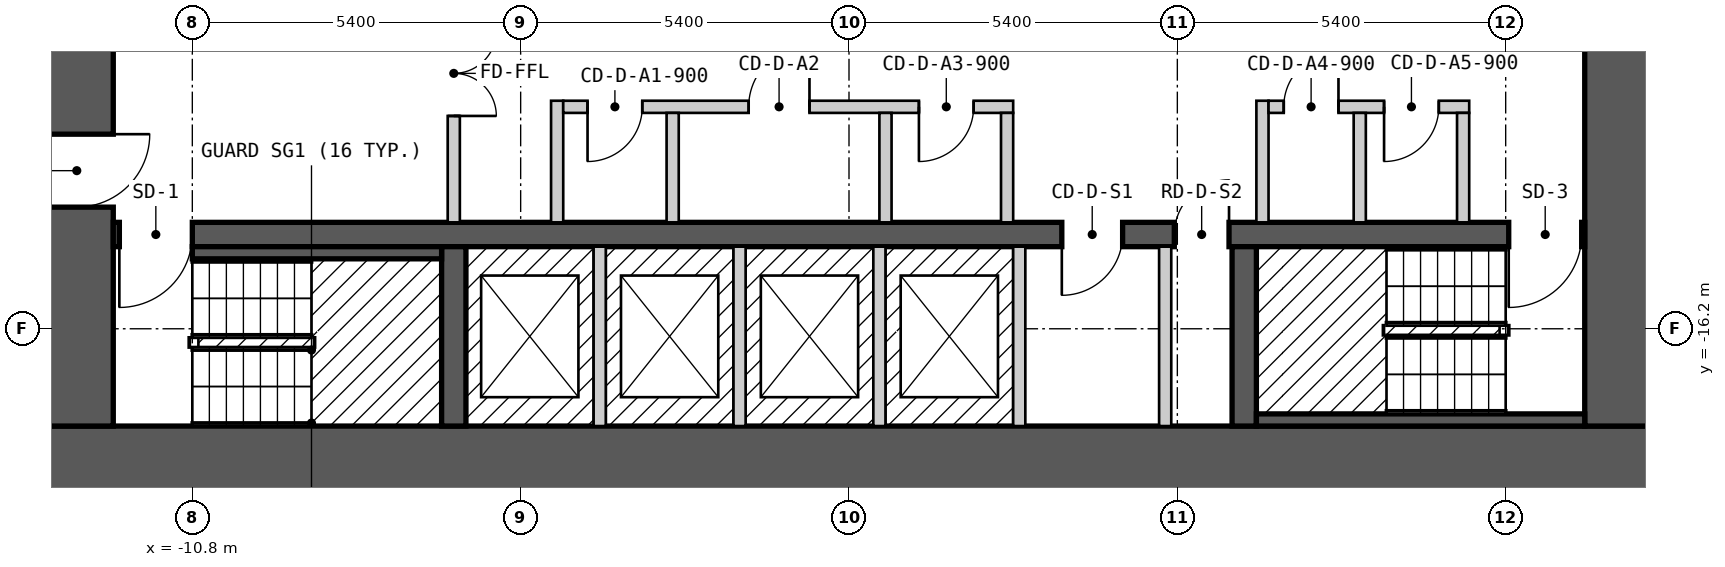
"""IFC4 building model, lengths in metres.
Left out: names, types, materials, properties, quantities, classifications, styles, units other than length and angle.
Written with IfcOpenShell. Run it as: python <this file> out.ifc"""

import sys

from ifc_helpers import new_model, si_unit, direction, frame, frame_2d, origin, place, context, subcontext, project, spatial, rectangle, extrude, element, fill, save


model = new_model("IFC4")
c1 = context("Model", 3, precision=1e-05, world=origin(), true_north=direction((0.0, 1.0)))
c2 = subcontext(c1, "Body", "Model", "MODEL_VIEW")
j1 = project(units=[si_unit("LENGTHUNIT", "METRE"), si_unit("PLANEANGLEUNIT", "RADIAN")], contexts=[c1])
p1 = place(None, origin())
s1 = spatial("IfcSite", under=j1, at=p1, CompositionType="ELEMENT")
p2 = place(p1, origin())
s2 = spatial("IfcBuilding", under=s1, at=p2, CompositionType="ELEMENT")
p3 = place(p2, frame((0.0, 0.0, 56.4)))
s3 = spatial("IfcBuildingStorey", under=s2, at=p3, CompositionType="ELEMENT", Elevation=56.4)
p4 = place(p3, frame((-13.3, -18.4, 0.0), z_axis=(0.0, 0.0, 1.0), x_axis=(1.0, 0.0, 0.0)))
e1 = element("IfcWall", 1, at=p4, inside=s3, PredefinedType="SHEAR", context=c2, shape_type="SweptSolid", body=[
    extrude(rectangle(XDim=26.6, YDim=1.2, at=frame_2d((13.3, 0.0))), origin(), (0.0, 0.0, 1.0), 2.7),
])
p5 = place(p3, frame((-12.7, -17.8, 0.0), z_axis=(0.0, 0.0, 1.0), x_axis=(0.0, 1.0, 0.0)))
e2 = element("IfcWall", 2, at=p5, inside=s3, PredefinedType="SHEAR", context=c2, shape_type="SweptSolid", body=[
    extrude(rectangle(XDim=11.6, YDim=1.2, at=frame_2d((5.8, 0.0))), origin(), (0.0, 0.0, 1.0), 2.7),
])
p6 = place(p5, frame((3.6, 0.0, 0.0)))
e3 = element("IfcOpeningElement", 3, at=p6, cuts=e2, PredefinedType="OPENING", context=c2, shape_type="SweptSolid", body=[
    extrude(rectangle(XDim=1.2, YDim=2.1, at=frame_2d((0.6, 1.05))), frame((0.0, 0.61, 0.0), z_axis=(0.0, -1.0, 0.0), x_axis=(1.0, 0.0, 0.0)), (0.0, 0.0, 1.0), 1.22),
])
p7 = place(p3, frame((12.7, -17.8, 0.0), z_axis=(0.0, 0.0, 1.0), x_axis=(0.0, 1.0, 0.0)))
e4 = element("IfcWall", 4, at=p7, inside=s3, PredefinedType="SHEAR", context=c2, shape_type="SweptSolid", body=[
    extrude(rectangle(XDim=11.6, YDim=1.2, at=frame_2d((5.8, 0.0))), origin(), (0.0, 0.0, 1.0), 2.7),
])
p8 = place(p3, frame((-12.1, -14.65, 0.0), z_axis=(0.0, 0.0, 1.0), x_axis=(1.0, 0.0, 0.0)))
e5 = element("IfcWall", 5, at=p8, inside=s3, PredefinedType="SHEAR", context=c2, shape_type="SweptSolid", body=[
    extrude(rectangle(XDim=24.2, YDim=0.4, at=frame_2d((12.1, 0.0))), origin(), (0.0, 0.0, 1.0), 2.7),
])
p9 = place(p8, frame((1.3, 0.0, 0.0), z_axis=(0.0, 0.0, 1.0), x_axis=(-1.0, 0.0, 0.0)))
e6 = element("IfcOpeningElement", 6, at=p9, cuts=e5, PredefinedType="OPENING", context=c2, shape_type="SweptSolid", body=[
    extrude(rectangle(XDim=1.2, YDim=2.1, at=frame_2d((0.6, 1.05))), frame((0.0, 0.21, 0.0), z_axis=(0.0, -1.0, 0.0), x_axis=(1.0, 0.0, 0.0)), (0.0, 0.0, 1.0), 0.42),
])
p10 = place(p8, frame((24.15, 0.0, 0.0), z_axis=(0.0, 0.0, 1.0), x_axis=(-1.0, 0.0, 0.0)))
e7 = element("IfcOpeningElement", 7, at=p10, cuts=e5, PredefinedType="OPENING", context=c2, shape_type="SweptSolid", body=[
    extrude(rectangle(XDim=1.2, YDim=2.1, at=frame_2d((0.6, 1.05))), frame((0.0, 0.21, 0.0), z_axis=(0.0, -1.0, 0.0), x_axis=(1.0, 0.0, 0.0)), (0.0, 0.0, 1.0), 0.42),
])
p11 = place(p8, frame((16.6, 0.0, 0.0), z_axis=(0.0, 0.0, 1.0), x_axis=(-1.0, 0.0, 0.0)))
e8 = element("IfcOpeningElement", 8, at=p11, cuts=e5, PredefinedType="OPENING", context=c2, shape_type="SweptSolid", body=[
    extrude(rectangle(XDim=1.0, YDim=2.1, at=frame_2d((0.5, 1.05))), frame((0.0, 0.21, 0.0), z_axis=(0.0, -1.0, 0.0), x_axis=(1.0, 0.0, 0.0)), (0.0, 0.0, 1.0), 0.42),
])
p12 = place(p8, frame((18.35, 0.0, 0.0), z_axis=(0.0, 0.0, 1.0), x_axis=(-1.0, 0.0, 0.0)))
e9 = element("IfcOpeningElement", 9, at=p12, cuts=e5, PredefinedType="OPENING", context=c2, shape_type="SweptSolid", body=[
    extrude(rectangle(XDim=0.9, YDim=2.1, at=frame_2d((0.45, 1.05))), frame((0.0, 0.21, 0.0), z_axis=(0.0, -1.0, 0.0), x_axis=(1.0, 0.0, 0.0)), (0.0, 0.0, 1.0), 0.42),
])
for number, where, z_axis, x_axis in (
    (10, (-6.5, -17.8, 0.0), (0.0, 0.0, 1.0), (0.0, 1.0, 0.0)),
    (11, (6.5, -17.8, 0.0), (0.0, 0.0, 1.0), (0.0, 1.0, 0.0)),
):
    element("IfcWall", number, at=place(p3, frame(where, z_axis=z_axis, x_axis=x_axis)), inside=s3, PredefinedType="SHEAR", context=c2, shape_type="SweptSolid", body=[
        extrude(rectangle(XDim=2.95, YDim=0.4, at=frame_2d((1.475, 0.0))), origin(), (0.0, 0.0, 1.0), 2.7),
    ])
p13 = place(p3, frame((-10.8, -14.95, 0.0), z_axis=(0.0, 0.0, 1.0), x_axis=(1.0, 0.0, 0.0)))
e12 = element("IfcWall", 12, at=p13, inside=s3, PredefinedType="SOLIDWALL", context=c2, shape_type="SweptSolid", body=[
    extrude(rectangle(XDim=4.1, YDim=0.2, at=frame_2d((2.05, 0.0))), origin(), (0.0, 0.0, 1.0), 2.7),
])
p14 = place(p3, frame((-6.5, -14.45, 0.0), z_axis=(0.0, 0.0, 1.0), x_axis=(0.0, 1.0, 0.0)))
e13 = element("IfcWall", 13, at=p14, inside=s3, PredefinedType="PARTITIONING", context=c2, shape_type="SweptSolid", body=[
    extrude(rectangle(XDim=4.9, YDim=0.2, at=frame_2d((2.45, 0.0))), origin(), (0.0, 0.0, 1.0), 2.7),
])
p15 = place(p14, frame((3.15, 0.0, 0.0), z_axis=(0.0, 0.0, 1.0), x_axis=(-1.0, 0.0, 0.0)))
e14 = element("IfcOpeningElement", 14, at=p15, cuts=e13, PredefinedType="OPENING", context=c2, shape_type="SweptSolid", body=[
    extrude(rectangle(XDim=1.4, YDim=2.1, at=frame_2d((0.7, 1.05))), frame((0.0, 0.11, 0.0), z_axis=(0.0, -1.0, 0.0), x_axis=(1.0, 0.0, 0.0)), (0.0, 0.0, 1.0), 0.22),
])
p16 = place(p3, frame((-4.8, -14.45, 0.0), z_axis=(0.0, 0.0, 1.0), x_axis=(0.0, 1.0, 0.0)))
e15 = element("IfcWall", 15, at=p16, inside=s3, PredefinedType="PARTITIONING", context=c2, shape_type="SweptSolid", body=[
    extrude(rectangle(XDim=2.0, YDim=0.2, at=frame_2d((1.0, 0.0))), origin(), (0.0, 0.0, 1.0), 2.7),
])
p17 = place(p3, frame((-4.7, -12.55, 0.0), z_axis=(0.0, 0.0, 1.0), x_axis=(1.0, 0.0, 0.0)))
e16 = element("IfcWall", 16, at=p17, inside=s3, PredefinedType="PARTITIONING", context=c2, shape_type="SweptSolid", body=[
    extrude(rectangle(XDim=7.4, YDim=0.2, at=frame_2d((3.7, 0.0))), origin(), (0.0, 0.0, 1.0), 2.7),
])
p18 = place(p17, frame((1.3, 0.0, 0.0), z_axis=(0.0, 0.0, 1.0), x_axis=(-1.0, 0.0, 0.0)))
e17 = element("IfcOpeningElement", 17, at=p18, cuts=e16, PredefinedType="OPENING", context=c2, shape_type="SweptSolid", body=[
    extrude(rectangle(XDim=0.9, YDim=2.1, at=frame_2d((0.45, 1.05))), frame((0.0, 0.11, 0.0), z_axis=(0.0, -1.0, 0.0), x_axis=(1.0, 0.0, 0.0)), (0.0, 0.0, 1.0), 0.22),
])
p19 = place(p17, frame((4.05, 0.0, 0.0), z_axis=(0.0, 0.0, 1.0), x_axis=(-1.0, 0.0, 0.0)))
e18 = element("IfcOpeningElement", 18, at=p19, cuts=e16, PredefinedType="OPENING", context=c2, shape_type="SweptSolid", body=[
    extrude(rectangle(XDim=1.0, YDim=2.1, at=frame_2d((0.5, 1.05))), frame((0.0, 0.11, 0.0), z_axis=(0.0, -1.0, 0.0), x_axis=(1.0, 0.0, 0.0)), (0.0, 0.0, 1.0), 0.22),
])
p20 = place(p17, frame((6.75, 0.0, 0.0), z_axis=(0.0, 0.0, 1.0), x_axis=(-1.0, 0.0, 0.0)))
e19 = element("IfcOpeningElement", 19, at=p20, cuts=e16, PredefinedType="OPENING", context=c2, shape_type="SweptSolid", body=[
    extrude(rectangle(XDim=0.9, YDim=2.1, at=frame_2d((0.45, 1.05))), frame((0.0, 0.11, 0.0), z_axis=(0.0, -1.0, 0.0), x_axis=(1.0, 0.0, 0.0)), (0.0, 0.0, 1.0), 0.22),
])
p21 = place(p3, frame((-4.1, -17.8, 0.0), z_axis=(0.0, 0.0, 1.0), x_axis=(0.0, 1.0, 0.0)))
e20 = element("IfcWall", 20, at=p21, inside=s3, PredefinedType="SOLIDWALL", context=c2, shape_type="SweptSolid", body=[
    extrude(rectangle(XDim=2.95, YDim=0.2, at=frame_2d((1.475, 0.0))), origin(), (0.0, 0.0, 1.0), 2.7),
])
p22 = place(p3, frame((-2.9, -14.45, 0.0), z_axis=(0.0, 0.0, 1.0), x_axis=(0.0, 1.0, 0.0)))
e21 = element("IfcWall", 21, at=p22, inside=s3, PredefinedType="PARTITIONING", context=c2, shape_type="SweptSolid", body=[
    extrude(rectangle(XDim=1.8, YDim=0.2, at=frame_2d((0.9, 0.0))), origin(), (0.0, 0.0, 1.0), 2.7),
])
for number, where, z_axis, x_axis in (
    (22, (-1.8, -17.8, 0.0), (0.0, 0.0, 1.0), (0.0, 1.0, 0.0)),
    (23, (0.5, -17.8, 0.0), (0.0, 0.0, 1.0), (0.0, 1.0, 0.0)),
):
    element("IfcWall", number, at=place(p3, frame(where, z_axis=z_axis, x_axis=x_axis)), inside=s3, PredefinedType="SOLIDWALL", context=c2, shape_type="SweptSolid", body=[
        extrude(rectangle(XDim=2.95, YDim=0.2, at=frame_2d((1.475, 0.0))), origin(), (0.0, 0.0, 1.0), 2.7),
    ])
for number, where, z_axis, x_axis in (
    (24, (0.6, -14.45, 0.0), (0.0, 0.0, 1.0), (0.0, 1.0, 0.0)),
    (25, (2.6, -14.45, 0.0), (0.0, 0.0, 1.0), (0.0, 1.0, 0.0)),
):
    element("IfcWall", number, at=place(p3, frame(where, z_axis=z_axis, x_axis=x_axis)), inside=s3, PredefinedType="PARTITIONING", context=c2, shape_type="SweptSolid", body=[
        extrude(rectangle(XDim=1.8, YDim=0.2, at=frame_2d((0.9, 0.0))), origin(), (0.0, 0.0, 1.0), 2.7),
    ])
p23 = place(p3, frame((2.8, -17.8, 0.0), z_axis=(0.0, 0.0, 1.0), x_axis=(0.0, 1.0, 0.0)))
e26 = element("IfcWall", 26, at=p23, inside=s3, PredefinedType="SOLIDWALL", context=c2, shape_type="SweptSolid", body=[
    extrude(rectangle(XDim=2.95, YDim=0.2, at=frame_2d((1.475, 0.0))), origin(), (0.0, 0.0, 1.0), 2.7),
])
p24 = place(p3, frame((5.2, -17.8, 0.0), z_axis=(0.0, 0.0, 1.0), x_axis=(0.0, 1.0, 0.0)))
e27 = element("IfcWall", 27, at=p24, inside=s3, PredefinedType="PARTITIONING", context=c2, shape_type="SweptSolid", body=[
    extrude(rectangle(XDim=2.95, YDim=0.2, at=frame_2d((1.475, 0.0))), origin(), (0.0, 0.0, 1.0), 2.7),
])
p25 = place(p3, frame((6.7, -17.7, 0.0), z_axis=(0.0, 0.0, 1.0), x_axis=(1.0, 0.0, 0.0)))
e28 = element("IfcWall", 28, at=p25, inside=s3, PredefinedType="SOLIDWALL", context=c2, shape_type="SweptSolid", body=[
    extrude(rectangle(XDim=5.4, YDim=0.2, at=frame_2d((2.7, 0.0))), origin(), (0.0, 0.0, 1.0), 2.7),
])
p26 = place(p3, frame((6.8, -14.45, 0.0), z_axis=(0.0, 0.0, 1.0), x_axis=(0.0, 1.0, 0.0)))
e29 = element("IfcWall", 29, at=p26, inside=s3, PredefinedType="PARTITIONING", context=c2, shape_type="SweptSolid", body=[
    extrude(rectangle(XDim=2.0, YDim=0.2, at=frame_2d((1.0, 0.0))), origin(), (0.0, 0.0, 1.0), 2.7),
])
p27 = place(p3, frame((6.9, -12.55, 0.0), z_axis=(0.0, 0.0, 1.0), x_axis=(1.0, 0.0, 0.0)))
e30 = element("IfcWall", 30, at=p27, inside=s3, PredefinedType="PARTITIONING", context=c2, shape_type="SweptSolid", body=[
    extrude(rectangle(XDim=3.3, YDim=0.2, at=frame_2d((1.65, 0.0))), origin(), (0.0, 0.0, 1.0), 2.7),
])
p28 = place(p27, frame((1.15, 0.0, 0.0), z_axis=(0.0, 0.0, 1.0), x_axis=(-1.0, 0.0, 0.0)))
e31 = element("IfcOpeningElement", 31, at=p28, cuts=e30, PredefinedType="OPENING", context=c2, shape_type="SweptSolid", body=[
    extrude(rectangle(XDim=0.9, YDim=2.1, at=frame_2d((0.45, 1.05))), frame((0.0, 0.11, 0.0), z_axis=(0.0, -1.0, 0.0), x_axis=(1.0, 0.0, 0.0)), (0.0, 0.0, 1.0), 0.22),
])
p29 = place(p27, frame((2.8, 0.0, 0.0), z_axis=(0.0, 0.0, 1.0), x_axis=(-1.0, 0.0, 0.0)))
e32 = element("IfcOpeningElement", 32, at=p29, cuts=e30, PredefinedType="OPENING", context=c2, shape_type="SweptSolid", body=[
    extrude(rectangle(XDim=0.9, YDim=2.1, at=frame_2d((0.45, 1.05))), frame((0.0, 0.11, 0.0), z_axis=(0.0, -1.0, 0.0), x_axis=(1.0, 0.0, 0.0)), (0.0, 0.0, 1.0), 0.22),
])
for number, where, z_axis, x_axis in (
    (33, (8.4, -14.45, 0.0), (0.0, 0.0, 1.0), (0.0, 1.0, 0.0)),
    (34, (10.1, -14.45, 0.0), (0.0, 0.0, 1.0), (0.0, 1.0, 0.0)),
):
    element("IfcWall", number, at=place(p3, frame(where, z_axis=z_axis, x_axis=x_axis)), inside=s3, PredefinedType="PARTITIONING", context=c2, shape_type="SweptSolid", body=[
        extrude(rectangle(XDim=1.8, YDim=0.2, at=frame_2d((0.9, 0.0))), origin(), (0.0, 0.0, 1.0), 2.7),
    ])
p30 = place(p9, origin())
e35 = element("IfcDoor", 35, at=p30, inside=s3, OperationType="SINGLE_SWING_RIGHT", PredefinedType="DOOR", context=c2, shape_type="SweptSolid", body=[
    extrude(rectangle(XDim=1.2, YDim=2.1, at=frame_2d((0.6, 1.05))), frame((0.0, 0.025, 0.0), z_axis=(0.0, -1.0, 0.0), x_axis=(1.0, 0.0, 0.0)), (0.0, 0.0, 1.0), 0.05),
])
fill(e6, e35)
p31 = place(p10, origin())
e36 = element("IfcDoor", 36, at=p31, inside=s3, OperationType="SINGLE_SWING_RIGHT", PredefinedType="DOOR", context=c2, shape_type="SweptSolid", body=[
    extrude(rectangle(XDim=1.2, YDim=2.1, at=frame_2d((0.6, 1.05))), frame((0.0, 0.025, 0.0), z_axis=(0.0, -1.0, 0.0), x_axis=(1.0, 0.0, 0.0)), (0.0, 0.0, 1.0), 0.05),
])
fill(e7, e36)
p32 = place(p6, origin())
e37 = element("IfcDoor", 37, at=p32, inside=s3, OperationType="SINGLE_SWING_RIGHT", PredefinedType="DOOR", context=c2, shape_type="SweptSolid", body=[
    extrude(rectangle(XDim=1.2, YDim=2.1, at=frame_2d((0.6, 1.05))), frame((0.0, 0.025, 0.0), z_axis=(0.0, -1.0, 0.0), x_axis=(1.0, 0.0, 0.0)), (0.0, 0.0, 1.0), 0.05),
])
fill(e3, e37)
p33 = place(p15, origin())
e38 = element("IfcDoor", 38, at=p33, inside=s3, OperationType="DOUBLE_DOOR_SINGLE_SWING", PredefinedType="DOOR", context=c2, shape_type="SweptSolid", body=[
    extrude(rectangle(XDim=1.4, YDim=2.1, at=frame_2d((0.7, 1.05))), frame((0.0, 0.025, 0.0), z_axis=(0.0, -1.0, 0.0), x_axis=(1.0, 0.0, 0.0)), (0.0, 0.0, 1.0), 0.05),
])
fill(e14, e38)
p34 = place(p18, origin())
e39 = element("IfcDoor", 39, at=p34, inside=s3, OperationType="SINGLE_SWING_RIGHT", PredefinedType="DOOR", context=c2, shape_type="SweptSolid", body=[
    extrude(rectangle(XDim=0.9, YDim=2.1, at=frame_2d((0.45, 1.05))), frame((0.0, 0.025, 0.0), z_axis=(0.0, -1.0, 0.0), x_axis=(1.0, 0.0, 0.0)), (0.0, 0.0, 1.0), 0.05),
])
fill(e17, e39)
p35 = place(p19, origin())
e40 = element("IfcDoor", 40, at=p35, inside=s3, OperationType="SINGLE_SWING_LEFT", PredefinedType="DOOR", context=c2, shape_type="SweptSolid", body=[
    extrude(rectangle(XDim=1.0, YDim=2.1, at=frame_2d((0.5, 1.05))), frame((0.0, 0.025, 0.0), z_axis=(0.0, -1.0, 0.0), x_axis=(1.0, 0.0, 0.0)), (0.0, 0.0, 1.0), 0.05),
])
fill(e18, e40)
p36 = place(p20, origin())
e41 = element("IfcDoor", 41, at=p36, inside=s3, OperationType="SINGLE_SWING_RIGHT", PredefinedType="DOOR", context=c2, shape_type="SweptSolid", body=[
    extrude(rectangle(XDim=0.9, YDim=2.1, at=frame_2d((0.45, 1.05))), frame((0.0, 0.025, 0.0), z_axis=(0.0, -1.0, 0.0), x_axis=(1.0, 0.0, 0.0)), (0.0, 0.0, 1.0), 0.05),
])
fill(e19, e41)
p37 = place(p28, origin())
e42 = element("IfcDoor", 42, at=p37, inside=s3, OperationType="SINGLE_SWING_LEFT", PredefinedType="DOOR", context=c2, shape_type="SweptSolid", body=[
    extrude(rectangle(XDim=0.9, YDim=2.1, at=frame_2d((0.45, 1.05))), frame((0.0, 0.025, 0.0), z_axis=(0.0, -1.0, 0.0), x_axis=(1.0, 0.0, 0.0)), (0.0, 0.0, 1.0), 0.05),
])
fill(e31, e42)
p38 = place(p29, origin())
e43 = element("IfcDoor", 43, at=p38, inside=s3, OperationType="SINGLE_SWING_RIGHT", PredefinedType="DOOR", context=c2, shape_type="SweptSolid", body=[
    extrude(rectangle(XDim=0.9, YDim=2.1, at=frame_2d((0.45, 1.05))), frame((0.0, 0.025, 0.0), z_axis=(0.0, -1.0, 0.0), x_axis=(1.0, 0.0, 0.0)), (0.0, 0.0, 1.0), 0.05),
])
fill(e32, e43)
p39 = place(p11, origin())
e44 = element("IfcDoor", 44, at=p39, inside=s3, OperationType="SINGLE_SWING_RIGHT", PredefinedType="DOOR", context=c2, shape_type="SweptSolid", body=[
    extrude(rectangle(XDim=1.0, YDim=2.1, at=frame_2d((0.5, 1.05))), frame((0.0, 0.025, 0.0), z_axis=(0.0, -1.0, 0.0), x_axis=(1.0, 0.0, 0.0)), (0.0, 0.0, 1.0), 0.05),
])
fill(e8, e44)
p40 = place(p12, origin())
e45 = element("IfcDoor", 45, at=p40, inside=s3, OperationType="SINGLE_SWING_LEFT", PredefinedType="DOOR", context=c2, shape_type="SweptSolid", body=[
    extrude(rectangle(XDim=0.9, YDim=2.1, at=frame_2d((0.45, 1.05))), frame((0.0, 0.025, 0.0), z_axis=(0.0, -1.0, 0.0), x_axis=(1.0, 0.0, 0.0)), (0.0, 0.0, 1.0), 0.05),
])
fill(e9, e45)
save(model, sys.argv[1])
